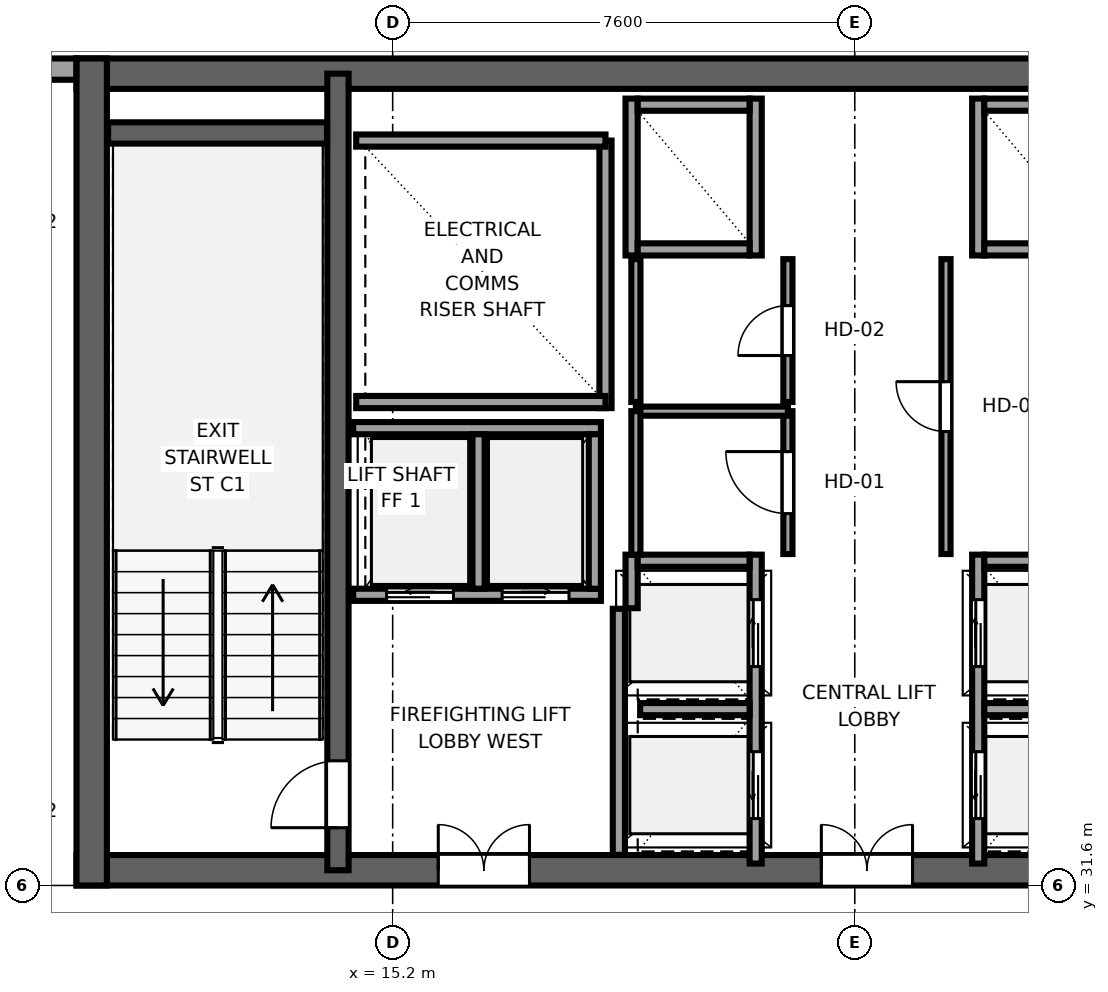
"""IFC4 building model, lengths in metres.
Left out: names, types, materials, properties, quantities, classifications, styles, units other than length and angle.
Written with IfcOpenShell. Run it as: python <this file> out.ifc"""

import sys

from ifc_helpers import new_model, si_unit, direction, frame, frame_2d, origin, place, context, subcontext, project, spatial, rectangle, extrude, source, transform, mapped, element, fill, save


model = new_model("IFC4")
c1 = context("Model", 3, precision=1e-05, world=origin(), true_north=direction((0.0, 1.0)))
c2 = subcontext(c1, "Body", "Model", "MODEL_VIEW")
j1 = project(units=[si_unit("LENGTHUNIT", "METRE"), si_unit("PLANEANGLEUNIT", "RADIAN")], contexts=[c1])
p1 = place(None, origin())
s1 = spatial("IfcSite", under=j1, at=p1, CompositionType="ELEMENT")
p2 = place(p1, origin())
s2 = spatial("IfcBuilding", under=s1, at=p2, CompositionType="ELEMENT")
p3 = place(p2, frame((0.0, 0.0, 266.5)))
s3 = spatial("IfcBuildingStorey", under=s2, at=p3, CompositionType="ELEMENT", Elevation=266.5)
p4 = place(p3, frame((10.0, 31.85, 0.0), z_axis=(0.0, 0.0, 1.0), x_axis=(1.0, 0.0, 0.0)))
e1 = element("IfcWall", 1, at=p4, inside=s3, PredefinedType="SHEAR", context=c2, shape_type="SweptSolid", body=[
    extrude(rectangle(XDim=26.0, YDim=0.5, at=frame_2d((13.0, 0.0))), origin(), (0.0, 0.0, 1.0), 3.55),
])
p5 = place(p4, frame((7.45, 0.0, 0.0), z_axis=(0.0, 0.0, 1.0), x_axis=(-1.0, 0.0, 0.0)))
e2 = element("IfcOpeningElement", 2, at=p5, cuts=e1, PredefinedType="OPENING", context=c2, shape_type="SweptSolid", body=[
    extrude(rectangle(XDim=1.5, YDim=2.04, at=frame_2d((0.75, 1.02))), frame((0.0, 0.26, 0.0), z_axis=(0.0, -1.0, 0.0), x_axis=(1.0, 0.0, 0.0)), (0.0, 0.0, 1.0), 0.52),
])
p6 = place(p4, frame((13.75, 0.0, 0.0), z_axis=(0.0, 0.0, 1.0), x_axis=(-1.0, 0.0, 0.0)))
e3 = element("IfcOpeningElement", 3, at=p6, cuts=e1, PredefinedType="OPENING", context=c2, shape_type="SweptSolid", body=[
    extrude(rectangle(XDim=1.5, YDim=2.04, at=frame_2d((0.75, 1.02))), frame((0.0, 0.26, 0.0), z_axis=(0.0, -1.0, 0.0), x_axis=(1.0, 0.0, 0.0)), (0.0, 0.0, 1.0), 0.52),
])
p7 = place(p4, frame((20.05, 0.0, 0.0), z_axis=(0.0, 0.0, 1.0), x_axis=(-1.0, 0.0, 0.0)))
e4 = element("IfcOpeningElement", 4, at=p7, cuts=e1, PredefinedType="OPENING", context=c2, shape_type="SweptSolid", body=[
    extrude(rectangle(XDim=1.5, YDim=2.04, at=frame_2d((0.75, 1.02))), frame((0.0, 0.26, 0.0), z_axis=(0.0, -1.0, 0.0), x_axis=(1.0, 0.0, 0.0)), (0.0, 0.0, 1.0), 0.52),
])
p8 = place(p3, frame((10.0, 44.95, 0.0), z_axis=(0.0, 0.0, 1.0), x_axis=(1.0, 0.0, 0.0)))
e5 = element("IfcWall", 5, at=p8, inside=s3, PredefinedType="SHEAR", context=c2, shape_type="SweptSolid", body=[
    extrude(rectangle(XDim=26.0, YDim=0.5, at=frame_2d((13.0, 0.0))), origin(), (0.0, 0.0, 1.0), 3.55),
])
p9 = place(p3, frame((10.25, 31.6, 0.0), z_axis=(0.0, 0.0, 1.0), x_axis=(0.0, 1.0, 0.0)))
e6 = element("IfcWall", 6, at=p9, inside=s3, PredefinedType="SHEAR", context=c2, shape_type="SweptSolid", body=[
    extrude(rectangle(XDim=13.6, YDim=0.5, at=frame_2d((6.8, 0.0))), origin(), (0.0, 0.0, 1.0), 3.55),
])
p10 = place(p3, frame((14.3, 31.85, 0.0), z_axis=(0.0, 0.0, 1.0), x_axis=(0.0, 1.0, 0.0)))
e7 = element("IfcWall", 7, at=p10, inside=s3, PredefinedType="SHEAR", context=c2, shape_type="SweptSolid", body=[
    extrude(rectangle(XDim=13.1, YDim=0.35, at=frame_2d((6.55, 0.0))), origin(), (0.0, 0.0, 1.0), 3.55),
])
p11 = place(p10, frame((0.7, 0.0, 0.0)))
e8 = element("IfcOpeningElement", 8, at=p11, cuts=e7, PredefinedType="OPENING", context=c2, shape_type="SweptSolid", body=[
    extrude(rectangle(XDim=1.1, YDim=2.12, at=frame_2d((0.55, 1.06))), frame((0.0, 0.185, 0.0), z_axis=(0.0, -1.0, 0.0), x_axis=(1.0, 0.0, 0.0)), (0.0, 0.0, 1.0), 0.37),
])
p12 = place(p3, frame((10.52, 43.975, 0.0), z_axis=(0.0, 0.0, 1.0), x_axis=(1.0, 0.0, 0.0)))
e9 = element("IfcWall", 9, at=p12, inside=s3, PredefinedType="SHEAR", context=c2, shape_type="SweptSolid", body=[
    extrude(rectangle(XDim=3.6, YDim=0.35, at=frame_2d((1.8, 0.0))), origin(), (0.0, 0.0, 1.0), 3.55),
])
p13 = place(p3, frame((9.996, 45.025, 0.0), z_axis=(0.0, 0.0, 1.0), x_axis=(-1.0, 0.0, 0.0)))
e10 = element("IfcWall", 10, at=p13, inside=s3, PredefinedType="SOLIDWALL", context=c2, shape_type="SweptSolid", body=[
    extrude(rectangle(XDim=2.979, YDim=0.35, at=frame_2d((1.49, 0.0))), origin(), (0.0, 0.0, 1.0), 2.04),
])
p14 = place(p3, frame((18.7, 39.45, 0.0), z_axis=(0.0, 0.0, 1.0), x_axis=(0.0, 1.0, 0.0)))
e11 = element("IfcWall", 11, at=p14, inside=s3, PredefinedType="SOLIDWALL", context=c2, shape_type="SweptSolid", body=[
    extrude(rectangle(XDim=4.4, YDim=0.2, at=frame_2d((2.2, 0.0))), origin(), (0.0, 0.0, 1.0), 3.25),
])
for number, where, z_axis, x_axis in (
    (12, (14.6, 39.55, 0.0), (0.0, 0.0, 1.0), (1.0, 0.0, 0.0)),
    (13, (14.6, 43.85, 0.0), (0.0, 0.0, 1.0), (1.0, 0.0, 0.0)),
):
    element("IfcWall", number, at=place(p3, frame(where, z_axis=z_axis, x_axis=x_axis)), inside=s3, PredefinedType="SOLIDWALL", context=c2, shape_type="SweptSolid", body=[
        extrude(rectangle(XDim=4.1, YDim=0.2, at=frame_2d((2.05, 0.0))), origin(), (0.0, 0.0, 1.0), 3.25),
    ])
p15 = place(p3, frame((18.92, 32.104, 0.0), z_axis=(0.0, 0.0, 1.0), x_axis=(0.0, 1.0, 0.0)))
e14 = element("IfcWall", 14, at=p15, inside=s3, PredefinedType="SOLIDWALL", context=c2, shape_type="SweptSolid", body=[
    extrude(rectangle(XDim=4.046, YDim=0.2, at=frame_2d((2.023, 0.0))), origin(), (0.0, 0.0, 1.0), 3.25),
])
p16 = place(p3, frame((21.17, 31.96, 0.0), z_axis=(0.0, 0.0, 1.0), x_axis=(0.0, 1.0, 0.0)))
e15 = element("IfcWall", 15, at=p16, inside=s3, PredefinedType="SOLIDWALL", context=c2, shape_type="SweptSolid", body=[
    extrude(rectangle(XDim=5.08, YDim=0.2, at=frame_2d((2.54, 0.0))), origin(), (0.0, 0.0, 1.0), 3.25),
])
p17 = place(p16, frame((0.74, 0.0, 0.0)))
e16 = element("IfcOpeningElement", 16, at=p17, cuts=e15, PredefinedType="OPENING", context=c2, shape_type="SweptSolid", body=[
    extrude(rectangle(XDim=1.1, YDim=2.12, at=frame_2d((0.55, 1.06))), frame((0.0, 0.11, 0.0), z_axis=(0.0, -1.0, 0.0), x_axis=(1.0, 0.0, 0.0)), (0.0, 0.0, 1.0), 0.22),
])
p18 = place(p16, frame((3.24, 0.0, 0.0)))
e17 = element("IfcOpeningElement", 17, at=p18, cuts=e15, PredefinedType="OPENING", context=c2, shape_type="SweptSolid", body=[
    extrude(rectangle(XDim=1.1, YDim=2.12, at=frame_2d((0.55, 1.06))), frame((0.0, 0.11, 0.0), z_axis=(0.0, -1.0, 0.0), x_axis=(1.0, 0.0, 0.0)), (0.0, 0.0, 1.0), 0.22),
])
p19 = place(p3, frame((19.13, 36.16, 0.0), z_axis=(0.0, 0.0, 1.0), x_axis=(0.0, 1.0, 0.0)))
e18 = element("IfcWall", 18, at=p19, inside=s3, PredefinedType="SOLIDWALL", context=c2, shape_type="SweptSolid", body=[
    extrude(rectangle(XDim=0.88, YDim=0.2, at=frame_2d((0.44, 0.0))), origin(), (0.0, 0.0, 1.0), 3.25),
])
p20 = place(p3, frame((19.23, 36.94, 0.0), z_axis=(0.0, 0.0, 1.0), x_axis=(1.0, 0.0, 0.0)))
e19 = element("IfcWall", 19, at=p20, inside=s3, PredefinedType="SOLIDWALL", context=c2, shape_type="SweptSolid", body=[
    extrude(rectangle(XDim=1.84, YDim=0.2, at=frame_2d((0.92, 0.0))), origin(), (0.0, 0.0, 1.0), 3.25),
])
p21 = place(p3, frame((19.27, 34.5, 0.0), z_axis=(0.0, 0.0, 1.0), x_axis=(1.0, 0.0, 0.0)))
e20 = element("IfcWall", 20, at=p21, inside=s3, PredefinedType="SOLIDWALL", context=c2, shape_type="SweptSolid", body=[
    extrude(rectangle(XDim=1.8, YDim=0.2, at=frame_2d((0.9, 0.0))), origin(), (0.0, 0.0, 1.0), 3.25),
])
for number, where, z_axis, x_axis in (
    (21, (21.17, 41.96, 0.0), (0.0, 0.0, 1.0), (0.0, 1.0, 0.0)),
    (22, (19.13, 41.96, 0.0), (0.0, 0.0, 1.0), (0.0, 1.0, 0.0)),
):
    element("IfcWall", number, at=place(p3, frame(where, z_axis=z_axis, x_axis=x_axis)), inside=s3, PredefinedType="SOLIDWALL", context=c2, shape_type="SweptSolid", body=[
        extrude(rectangle(XDim=2.58, YDim=0.2, at=frame_2d((1.29, 0.0))), origin(), (0.0, 0.0, 1.0), 3.25),
    ])
for number, where, z_axis, x_axis in (
    (23, (19.23, 42.06, 0.0), (0.0, 0.0, 1.0), (1.0, 0.0, 0.0)),
    (24, (19.23, 44.44, 0.0), (0.0, 0.0, 1.0), (1.0, 0.0, 0.0)),
):
    element("IfcWall", number, at=place(p3, frame(where, z_axis=z_axis, x_axis=x_axis)), inside=s3, PredefinedType="SOLIDWALL", context=c2, shape_type="SweptSolid", body=[
        extrude(rectangle(XDim=1.84, YDim=0.2, at=frame_2d((0.92, 0.0))), origin(), (0.0, 0.0, 1.0), 3.25),
    ])
p22 = place(p3, frame((14.55, 36.38, 0.0), z_axis=(0.0, 0.0, 1.0), x_axis=(1.0, 0.0, 0.0)))
e25 = element("IfcWall", 25, at=p22, inside=s3, PredefinedType="SOLIDWALL", context=c2, shape_type="SweptSolid", body=[
    extrude(rectangle(XDim=4.075, YDim=0.2, at=frame_2d((2.038, 0.0))), origin(), (0.0, 0.0, 1.0), 3.25),
])
p23 = place(p22, frame((0.55, 0.0, 0.0)))
e26 = element("IfcOpeningElement", 26, at=p23, cuts=e25, PredefinedType="OPENING", context=c2, shape_type="SweptSolid", body=[
    extrude(rectangle(XDim=1.1, YDim=2.12, at=frame_2d((0.55, 1.06))), frame((0.0, 0.11, 0.0), z_axis=(0.0, -1.0, 0.0), x_axis=(1.0, 0.0, 0.0)), (0.0, 0.0, 1.0), 0.22),
])
p24 = place(p22, frame((2.45, 0.0, 0.0)))
e27 = element("IfcOpeningElement", 27, at=p24, cuts=e25, PredefinedType="OPENING", context=c2, shape_type="SweptSolid", body=[
    extrude(rectangle(XDim=1.1, YDim=2.12, at=frame_2d((0.55, 1.06))), frame((0.0, 0.11, 0.0), z_axis=(0.0, -1.0, 0.0), x_axis=(1.0, 0.0, 0.0)), (0.0, 0.0, 1.0), 0.22),
])
p25 = place(p3, frame((14.55, 39.12, 0.0), z_axis=(0.0, 0.0, 1.0), x_axis=(1.0, 0.0, 0.0)))
e28 = element("IfcWall", 28, at=p25, inside=s3, PredefinedType="SOLIDWALL", context=c2, shape_type="SweptSolid", body=[
    extrude(rectangle(XDim=4.075, YDim=0.2, at=frame_2d((2.038, 0.0))), origin(), (0.0, 0.0, 1.0), 3.25),
])
for number, where, z_axis, x_axis in (
    (29, (18.525, 36.48, 0.0), (0.0, 0.0, 1.0), (0.0, 1.0, 0.0)),
    (30, (16.613, 36.48, 0.0), (0.0, 0.0, 1.0), (0.0, 1.0, 0.0)),
):
    element("IfcWall", number, at=place(p3, frame(where, z_axis=z_axis, x_axis=x_axis)), inside=s3, PredefinedType="SOLIDWALL", context=c2, shape_type="SweptSolid", body=[
        extrude(rectangle(XDim=2.54, YDim=0.2, at=frame_2d((1.27, 0.0))), origin(), (0.0, 0.0, 1.0), 3.25),
    ])
p26 = place(p3, frame((24.83, 31.96, 0.0), z_axis=(0.0, 0.0, 1.0), x_axis=(0.0, 1.0, 0.0)))
e31 = element("IfcWall", 31, at=p26, inside=s3, PredefinedType="SOLIDWALL", context=c2, shape_type="SweptSolid", body=[
    extrude(rectangle(XDim=5.08, YDim=0.2, at=frame_2d((2.54, 0.0))), origin(), (0.0, 0.0, 1.0), 3.25),
])
p27 = place(p26, frame((0.74, 0.0, 0.0)))
e32 = element("IfcOpeningElement", 32, at=p27, cuts=e31, PredefinedType="OPENING", context=c2, shape_type="SweptSolid", body=[
    extrude(rectangle(XDim=1.1, YDim=2.12, at=frame_2d((0.55, 1.06))), frame((0.0, 0.11, 0.0), z_axis=(0.0, -1.0, 0.0), x_axis=(1.0, 0.0, 0.0)), (0.0, 0.0, 1.0), 0.22),
])
p28 = place(p26, frame((3.24, 0.0, 0.0)))
e33 = element("IfcOpeningElement", 33, at=p28, cuts=e31, PredefinedType="OPENING", context=c2, shape_type="SweptSolid", body=[
    extrude(rectangle(XDim=1.1, YDim=2.12, at=frame_2d((0.55, 1.06))), frame((0.0, 0.11, 0.0), z_axis=(0.0, -1.0, 0.0), x_axis=(1.0, 0.0, 0.0)), (0.0, 0.0, 1.0), 0.22),
])
p29 = place(p3, frame((24.93, 36.94, 0.0), z_axis=(0.0, 0.0, 1.0), x_axis=(1.0, 0.0, 0.0)))
e34 = element("IfcWall", 34, at=p29, inside=s3, PredefinedType="SOLIDWALL", context=c2, shape_type="SweptSolid", body=[
    extrude(rectangle(XDim=1.84, YDim=0.2, at=frame_2d((0.92, 0.0))), origin(), (0.0, 0.0, 1.0), 3.25),
])
p30 = place(p3, frame((24.93, 34.5, 0.0), z_axis=(0.0, 0.0, 1.0), x_axis=(1.0, 0.0, 0.0)))
e35 = element("IfcWall", 35, at=p30, inside=s3, PredefinedType="SOLIDWALL", context=c2, shape_type="SweptSolid", body=[
    extrude(rectangle(XDim=1.8, YDim=0.2, at=frame_2d((0.9, 0.0))), origin(), (0.0, 0.0, 1.0), 3.25),
])
p31 = place(p3, frame((24.83, 41.96, 0.0), z_axis=(0.0, 0.0, 1.0), x_axis=(0.0, 1.0, 0.0)))
e36 = element("IfcWall", 36, at=p31, inside=s3, PredefinedType="SOLIDWALL", context=c2, shape_type="SweptSolid", body=[
    extrude(rectangle(XDim=2.58, YDim=0.2, at=frame_2d((1.29, 0.0))), origin(), (0.0, 0.0, 1.0), 3.25),
])
for number, where, z_axis, x_axis in (
    (37, (24.93, 42.06, 0.0), (0.0, 0.0, 1.0), (1.0, 0.0, 0.0)),
    (38, (24.93, 44.44, 0.0), (0.0, 0.0, 1.0), (1.0, 0.0, 0.0)),
):
    element("IfcWall", number, at=place(p3, frame(where, z_axis=z_axis, x_axis=x_axis)), inside=s3, PredefinedType="SOLIDWALL", context=c2, shape_type="SweptSolid", body=[
        extrude(rectangle(XDim=1.84, YDim=0.2, at=frame_2d((0.92, 0.0))), origin(), (0.0, 0.0, 1.0), 3.25),
    ])
p32 = place(p3, frame((21.7, 37.05, 0.0), z_axis=(0.0, 0.0, 1.0), x_axis=(0.0, 1.0, 0.0)))
e39 = element("IfcWall", 39, at=p32, inside=s3, PredefinedType="PARTITIONING", context=c2, shape_type="SweptSolid", body=[
    extrude(rectangle(XDim=2.35, YDim=0.15, at=frame_2d((1.175, 0.0))), origin(), (0.0, 0.0, 1.0), 3.25),
])
p33 = place(p32, frame((0.665, 0.0, 0.0)))
e40 = element("IfcOpeningElement", 40, at=p33, cuts=e39, PredefinedType="OPENING", context=c2, shape_type="SweptSolid", body=[
    extrude(rectangle(XDim=1.02, YDim=2.03, at=frame_2d((0.51, 1.015))), frame((0.0, 0.085, 0.0), z_axis=(0.0, -1.0, 0.0), x_axis=(1.0, 0.0, 0.0)), (0.0, 0.0, 1.0), 0.17),
])
p34 = place(p3, frame((19.2, 39.4, 0.0), z_axis=(0.0, 0.0, 1.0), x_axis=(1.0, 0.0, 0.0)))
e41 = element("IfcWall", 41, at=p34, inside=s3, PredefinedType="PARTITIONING", context=c2, shape_type="SweptSolid", body=[
    extrude(rectangle(XDim=2.5, YDim=0.15, at=frame_2d((1.25, 0.0))), origin(), (0.0, 0.0, 1.0), 3.25),
])
p35 = place(p3, frame((19.2, 37.04, 0.0), z_axis=(0.0, 0.0, 1.0), x_axis=(0.0, 1.0, 0.0)))
e42 = element("IfcWall", 42, at=p35, inside=s3, PredefinedType="PARTITIONING", context=c2, shape_type="SweptSolid", body=[
    extrude(rectangle(XDim=2.36, YDim=0.15, at=frame_2d((1.18, 0.0))), origin(), (0.0, 0.0, 1.0), 3.25),
])
p36 = place(p3, frame((21.7, 39.55, 0.0), z_axis=(0.0, 0.0, 1.0), x_axis=(0.0, 1.0, 0.0)))
e43 = element("IfcWall", 43, at=p36, inside=s3, PredefinedType="PARTITIONING", context=c2, shape_type="SweptSolid", body=[
    extrude(rectangle(XDim=2.35, YDim=0.15, at=frame_2d((1.175, 0.0))), origin(), (0.0, 0.0, 1.0), 3.25),
])
p37 = place(p36, frame((0.765, 0.0, 0.0)))
e44 = element("IfcOpeningElement", 44, at=p37, cuts=e43, PredefinedType="OPENING", context=c2, shape_type="SweptSolid", body=[
    extrude(rectangle(XDim=0.82, YDim=2.01, at=frame_2d((0.41, 1.005))), frame((0.0, 0.085, 0.0), z_axis=(0.0, -1.0, 0.0), x_axis=(1.0, 0.0, 0.0)), (0.0, 0.0, 1.0), 0.17),
])
p38 = place(p3, frame((19.2, 39.55, 0.0), z_axis=(0.0, 0.0, 1.0), x_axis=(0.0, 1.0, 0.0)))
e45 = element("IfcWall", 45, at=p38, inside=s3, PredefinedType="PARTITIONING", context=c2, shape_type="SweptSolid", body=[
    extrude(rectangle(XDim=2.35, YDim=0.15, at=frame_2d((1.175, 0.0))), origin(), (0.0, 0.0, 1.0), 3.25),
])
p39 = place(p3, frame((24.3, 37.05, 0.0), z_axis=(0.0, 0.0, 1.0), x_axis=(0.0, 1.0, 0.0)))
e46 = element("IfcWall", 46, at=p39, inside=s3, PredefinedType="PARTITIONING", context=c2, shape_type="SweptSolid", body=[
    extrude(rectangle(XDim=4.85, YDim=0.15, at=frame_2d((2.425, 0.0))), origin(), (0.0, 0.0, 1.0), 3.25),
])
p40 = place(p39, frame((2.015, 0.0, 0.0)))
e47 = element("IfcOpeningElement", 47, at=p40, cuts=e46, PredefinedType="OPENING", context=c2, shape_type="SweptSolid", body=[
    extrude(rectangle(XDim=0.82, YDim=2.01, at=frame_2d((0.41, 1.005))), frame((0.0, 0.085, 0.0), z_axis=(0.0, -1.0, 0.0), x_axis=(1.0, 0.0, 0.0)), (0.0, 0.0, 1.0), 0.17),
])
m1 = source(origin(), c2, "Body", "SweptSolid", [
    extrude(rectangle(XDim=1.1, YDim=2.12, at=frame_2d((0.55, 1.06))), frame((0.0, 0.025, 0.0), z_axis=(0.0, -1.0, 0.0), x_axis=(1.0, 0.0, 0.0)), (0.0, 0.0, 1.0), 0.05),
])
p41 = place(p11, origin())
e48 = element("IfcDoor", 48, at=p41, inside=s3, OperationType="SINGLE_SWING_LEFT", PredefinedType="DOOR", context=c2, shape_type="MappedRepresentation", body=[
    mapped(m1, transform((0.0, 0.0, 0.0), x_axis=(1.0, 0.0, 0.0), y_axis=(0.0, 1.0, 0.0), z_axis=(0.0, 0.0, 1.0), scale=1.0)),
])
fill(e8, e48)
m2 = source(origin(), c2, "Body", "SweptSolid", [
    extrude(rectangle(XDim=1.5, YDim=2.04, at=frame_2d((0.75, 1.02))), frame((0.0, 0.025, 0.0), z_axis=(0.0, -1.0, 0.0), x_axis=(1.0, 0.0, 0.0)), (0.0, 0.0, 1.0), 0.05),
])
p42 = place(p5, origin())
e49 = element("IfcDoor", 49, at=p42, inside=s3, OperationType="DOUBLE_DOOR_SINGLE_SWING", PredefinedType="DOOR", context=c2, shape_type="MappedRepresentation", body=[
    mapped(m2, transform((0.0, 0.0, 0.0), x_axis=(1.0, 0.0, 0.0), y_axis=(0.0, 1.0, 0.0), z_axis=(0.0, 0.0, 1.0), scale=1.0)),
])
fill(e2, e49)
p43 = place(p6, origin())
e50 = element("IfcDoor", 50, at=p43, inside=s3, OperationType="DOUBLE_DOOR_SINGLE_SWING", PredefinedType="DOOR", context=c2, shape_type="MappedRepresentation", body=[
    mapped(m2, transform((0.0, 0.0, 0.0), x_axis=(1.0, 0.0, 0.0), y_axis=(0.0, 1.0, 0.0), z_axis=(0.0, 0.0, 1.0), scale=1.0)),
])
fill(e3, e50)
m3 = source(origin(), c2, "Body", "SweptSolid", [
    extrude(rectangle(XDim=1.1, YDim=2.12, at=frame_2d((0.55, 1.06))), frame((0.0, 0.025, 0.0), z_axis=(0.0, -1.0, 0.0), x_axis=(1.0, 0.0, 0.0)), (0.0, 0.0, 1.0), 0.05),
])
p44 = place(p17, origin())
e51 = element("IfcDoor", 51, at=p44, inside=s3, OperationType="SLIDING_TO_LEFT", PredefinedType="DOOR", context=c2, shape_type="MappedRepresentation", body=[
    mapped(m3, transform((0.0, 0.0, 0.0), x_axis=(1.0, 0.0, 0.0), y_axis=(0.0, 1.0, 0.0), z_axis=(0.0, 0.0, 1.0), scale=1.0)),
])
fill(e16, e51)
p45 = place(p18, origin())
e52 = element("IfcDoor", 52, at=p45, inside=s3, OperationType="SLIDING_TO_RIGHT", PredefinedType="DOOR", context=c2, shape_type="MappedRepresentation", body=[
    mapped(m3, transform((0.0, 0.0, 0.0), x_axis=(1.0, 0.0, 0.0), y_axis=(0.0, 1.0, 0.0), z_axis=(0.0, 0.0, 1.0), scale=1.0)),
])
fill(e17, e52)
p46 = place(p23, origin())
e53 = element("IfcDoor", 53, at=p46, inside=s3, OperationType="SLIDING_TO_LEFT", PredefinedType="DOOR", context=c2, shape_type="MappedRepresentation", body=[
    mapped(m3, transform((0.0, 0.0, 0.0), x_axis=(1.0, 0.0, 0.0), y_axis=(0.0, 1.0, 0.0), z_axis=(0.0, 0.0, 1.0), scale=1.0)),
])
fill(e26, e53)
p47 = place(p24, origin())
e54 = element("IfcDoor", 54, at=p47, inside=s3, OperationType="SLIDING_TO_RIGHT", PredefinedType="DOOR", context=c2, shape_type="MappedRepresentation", body=[
    mapped(m3, transform((0.0, 0.0, 0.0), x_axis=(1.0, 0.0, 0.0), y_axis=(0.0, 1.0, 0.0), z_axis=(0.0, 0.0, 1.0), scale=1.0)),
])
fill(e27, e54)
p48 = place(p27, origin())
e55 = element("IfcDoor", 55, at=p48, inside=s3, OperationType="SLIDING_TO_LEFT", PredefinedType="DOOR", context=c2, shape_type="MappedRepresentation", body=[
    mapped(m3, transform((0.0, 0.0, 0.0), x_axis=(1.0, 0.0, 0.0), y_axis=(0.0, 1.0, 0.0), z_axis=(0.0, 0.0, 1.0), scale=1.0)),
])
fill(e32, e55)
p49 = place(p28, origin())
e56 = element("IfcDoor", 56, at=p49, inside=s3, OperationType="SLIDING_TO_RIGHT", PredefinedType="DOOR", context=c2, shape_type="MappedRepresentation", body=[
    mapped(m3, transform((0.0, 0.0, 0.0), x_axis=(1.0, 0.0, 0.0), y_axis=(0.0, 1.0, 0.0), z_axis=(0.0, 0.0, 1.0), scale=1.0)),
])
fill(e33, e56)
m4 = source(origin(), c2, "Body", "SweptSolid", [
    extrude(rectangle(XDim=1.02, YDim=2.03, at=frame_2d((0.51, 1.015))), frame((0.0, 0.025, 0.0), z_axis=(0.0, -1.0, 0.0), x_axis=(1.0, 0.0, 0.0)), (0.0, 0.0, 1.0), 0.05),
])
p50 = place(p33, origin())
e57 = element("IfcDoor", 57, at=p50, inside=s3, OperationType="SINGLE_SWING_RIGHT", PredefinedType="DOOR", context=c2, shape_type="MappedRepresentation", body=[
    mapped(m4, transform((0.0, 0.0, 0.0), x_axis=(1.0, 0.0, 0.0), y_axis=(0.0, 1.0, 0.0), z_axis=(0.0, 0.0, 1.0), scale=1.0)),
])
fill(e40, e57)
m5 = source(origin(), c2, "Body", "SweptSolid", [
    extrude(rectangle(XDim=0.82, YDim=2.01, at=frame_2d((0.41, 1.005))), frame((0.0, 0.025, 0.0), z_axis=(0.0, -1.0, 0.0), x_axis=(1.0, 0.0, 0.0)), (0.0, 0.0, 1.0), 0.05),
])
p51 = place(p37, origin())
e58 = element("IfcDoor", 58, at=p51, inside=s3, OperationType="SINGLE_SWING_LEFT", PredefinedType="DOOR", context=c2, shape_type="MappedRepresentation", body=[
    mapped(m5, transform((0.0, 0.0, 0.0), x_axis=(1.0, 0.0, 0.0), y_axis=(0.0, 1.0, 0.0), z_axis=(0.0, 0.0, 1.0), scale=1.0)),
])
fill(e44, e58)
p52 = place(p40, origin())
e59 = element("IfcDoor", 59, at=p52, inside=s3, OperationType="SINGLE_SWING_RIGHT", PredefinedType="DOOR", context=c2, shape_type="MappedRepresentation", body=[
    mapped(m5, transform((0.0, 0.0, 0.0), x_axis=(1.0, 0.0, 0.0), y_axis=(0.0, 1.0, 0.0), z_axis=(0.0, 0.0, 1.0), scale=1.0)),
])
fill(e47, e59)
save(model, sys.argv[1])
